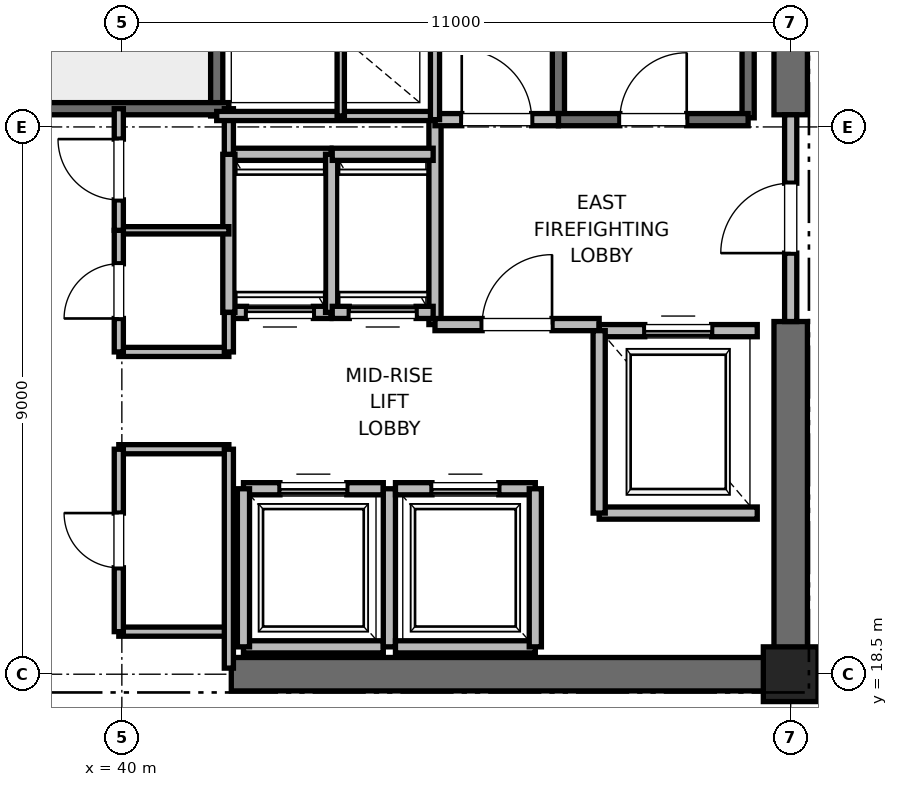
"""IFC4 building model, lengths in metres.
Left out: names, types, materials, properties, quantities, classifications, styles, units other than length and angle.
Written with IfcOpenShell. Run it as: python <this file> out.ifc"""

import sys

from ifc_helpers import new_model, si_unit, direction, frame, frame_2d, origin, origin_2d, place, context, subcontext, project, spatial, rectangle, extrude, element, fill, save


model = new_model("IFC4")
c1 = context("Model", 3, precision=1e-05, world=origin(), true_north=direction((0.0, 1.0)))
c2 = subcontext(c1, "Body", "Model", "MODEL_VIEW")
j1 = project(units=[si_unit("LENGTHUNIT", "METRE"), si_unit("PLANEANGLEUNIT", "RADIAN")], contexts=[c1])
p1 = place(None, origin())
s1 = spatial("IfcSite", under=j1, at=p1, CompositionType="ELEMENT")
p2 = place(p1, origin())
s2 = spatial("IfcBuilding", under=s1, at=p2, CompositionType="ELEMENT")
p3 = place(p2, frame((0.0, 0.0, 221.2)))
s3 = spatial("IfcBuildingStorey", under=s2, at=p3, CompositionType="ELEMENT", Elevation=221.2)
p4 = place(p3, frame((51.0, 18.5, 0.0), z_axis=(0.0, 0.0, 1.0), x_axis=(1.0, 0.0, 0.0)))
e1 = element("IfcColumn", 1, at=p4, inside=s3, PredefinedType="PILASTER", context=c2, shape_type="SweptSolid", body=[
    extrude(rectangle(XDim=0.9, YDim=0.9, at=origin_2d()), origin(), (0.0, 0.0, 1.0), 4.0),
])
p5 = place(p3, frame((41.8, 18.5, 0.0), z_axis=(0.0, 0.0, 1.0), x_axis=(1.0, 0.0, 0.0)))
e2 = element("IfcWall", 2, at=p5, inside=s3, PredefinedType="SHEAR", context=c2, shape_type="SweptSolid", body=[
    extrude(rectangle(XDim=9.2, YDim=0.55, at=frame_2d((4.6, 0.0))), origin(), (0.0, 0.0, 1.0), 3.775),
])
p6 = place(p3, frame((51.0, 18.5, 0.0), z_axis=(0.0, 0.0, 1.0), x_axis=(0.0, 1.0, 0.0)))
e3 = element("IfcWall", 3, at=p6, inside=s3, PredefinedType="SHEAR", context=c2, shape_type="SweptSolid", body=[
    extrude(rectangle(XDim=5.8, YDim=0.55, at=frame_2d((2.9, 0.0))), origin(), (0.0, 0.0, 1.0), 3.775),
])
p7 = place(p3, frame((51.0, 27.7, 0.0), z_axis=(0.0, 0.0, 1.0), x_axis=(0.0, 1.0, 0.0)))
e4 = element("IfcWall", 4, at=p7, inside=s3, PredefinedType="SHEAR", context=c2, shape_type="SweptSolid", body=[
    extrude(rectangle(XDim=8.8, YDim=0.55, at=frame_2d((4.4, 0.0))), origin(), (0.0, 0.0, 1.0), 3.775),
])
p8 = place(p3, frame((50.3, 27.65, 0.0), z_axis=(0.0, 0.0, 1.0), x_axis=(0.0, 1.0, 0.0)))
e5 = element("IfcWall", 5, at=p8, inside=s3, PredefinedType="SOLIDWALL", context=c2, shape_type="SweptSolid", body=[
    extrude(rectangle(XDim=8.15, YDim=0.2, at=frame_2d((4.075, 0.0))), origin(), (0.0, 0.0, 1.0), 3.775),
])
p9 = place(p3, frame((47.18, 27.62, 0.0), z_axis=(0.0, 0.0, 1.0), x_axis=(0.0, 1.0, 0.0)))
e6 = element("IfcWall", 6, at=p9, inside=s3, PredefinedType="SOLIDWALL", context=c2, shape_type="SweptSolid", body=[
    extrude(rectangle(XDim=8.18, YDim=0.2, at=frame_2d((4.09, 0.0))), origin(), (0.0, 0.0, 1.0), 3.775),
])
p10 = place(p3, frame((47.18, 27.62, 0.0), z_axis=(0.0, 0.0, 1.0), x_axis=(1.0, 0.0, 0.0)))
e7 = element("IfcWall", 7, at=p10, inside=s3, PredefinedType="SOLIDWALL", context=c2, shape_type="SweptSolid", body=[
    extrude(rectangle(XDim=3.12, YDim=0.2, at=frame_2d((1.56, 0.0))), origin(), (0.0, 0.0, 1.0), 3.775),
])
p11 = place(p10, frame((1.01, 0.0, 0.0)))
e8 = element("IfcOpeningElement", 8, at=p11, cuts=e7, PredefinedType="OPENING", context=c2, shape_type="SweptSolid", body=[
    extrude(rectangle(XDim=1.1, YDim=2.15, at=frame_2d((0.55, 1.075))), frame((0.0, 0.1, 0.0), z_axis=(0.0, -1.0, 0.0), x_axis=(1.0, 0.0, 0.0)), (0.0, 0.0, 1.0), 0.2),
])
p12 = place(p3, frame((41.56, 27.68, 0.0), z_axis=(0.0, 0.0, 1.0), x_axis=(0.0, 1.0, 0.0)))
e9 = element("IfcWall", 9, at=p12, inside=s3, PredefinedType="SOLIDWALL", context=c2, shape_type="SweptSolid", body=[
    extrude(rectangle(XDim=8.57, YDim=0.2, at=frame_2d((4.285, 0.0))), origin(), (0.0, 0.0, 1.0), 3.775),
])
p13 = place(p3, frame((38.44, 27.8, 0.0), z_axis=(0.0, 0.0, 1.0), x_axis=(1.0, 0.0, 0.0)))
e10 = element("IfcWall", 10, at=p13, inside=s3, PredefinedType="SOLIDWALL", context=c2, shape_type="SweptSolid", body=[
    extrude(rectangle(XDim=3.32, YDim=0.2, at=frame_2d((1.66, 0.0))), origin(), (0.0, 0.0, 1.0), 3.775),
])
p14 = place(p3, frame((45.15, 24.25, 0.0), z_axis=(0.0, 0.0, 1.0), x_axis=(0.0, 1.0, 0.0)))
e11 = element("IfcWall", 11, at=p14, inside=s3, PredefinedType="PARTITIONING", context=c2, shape_type="SweptSolid", body=[
    extrude(rectangle(XDim=3.37, YDim=0.2, at=frame_2d((1.685, 0.0))), origin(), (0.0, 0.0, 1.0), 3.775),
])
p15 = place(p3, frame((45.15, 24.25, 0.0), z_axis=(0.0, 0.0, 1.0), x_axis=(1.0, 0.0, 0.0)))
e12 = element("IfcWall", 12, at=p15, inside=s3, PredefinedType="PARTITIONING", context=c2, shape_type="SweptSolid", body=[
    extrude(rectangle(XDim=2.7, YDim=0.2, at=frame_2d((1.35, 0.0))), origin(), (0.0, 0.0, 1.0), 3.775),
])
p16 = place(p15, frame((0.775, 0.0, 0.0)))
e13 = element("IfcOpeningElement", 13, at=p16, cuts=e12, PredefinedType="OPENING", context=c2, shape_type="SweptSolid", body=[
    extrude(rectangle(XDim=1.15, YDim=2.2, at=frame_2d((0.575, 1.1))), frame((0.0, 0.1, 0.0), z_axis=(0.0, -1.0, 0.0), x_axis=(1.0, 0.0, 0.0)), (0.0, 0.0, 1.0), 0.2),
])
p17 = place(p3, frame((45.15, 27.62, 0.0), z_axis=(0.0, 0.0, 1.0), x_axis=(1.0, 0.0, 0.0)))
e14 = element("IfcWall", 14, at=p17, inside=s3, PredefinedType="PARTITIONING", context=c2, shape_type="SweptSolid", body=[
    extrude(rectangle(XDim=2.03, YDim=0.2, at=frame_2d((1.015, 0.0))), origin(), (0.0, 0.0, 1.0), 3.775),
])
p18 = place(p17, frame((0.44, 0.0, 0.0)))
e15 = element("IfcOpeningElement", 15, at=p18, cuts=e14, PredefinedType="OPENING", context=c2, shape_type="SweptSolid", body=[
    extrude(rectangle(XDim=1.15, YDim=2.2, at=frame_2d((0.575, 1.1))), frame((0.0, 0.1, 0.0), z_axis=(0.0, -1.0, 0.0), x_axis=(1.0, 0.0, 0.0)), (0.0, 0.0, 1.0), 0.2),
])
p19 = place(p3, frame((51.0, 24.3, 0.0), z_axis=(0.0, 0.0, 1.0), x_axis=(0.0, 1.0, 0.0)))
e16 = element("IfcWall", 16, at=p19, inside=s3, PredefinedType="PARTITIONING", context=c2, shape_type="SweptSolid", body=[
    extrude(rectangle(XDim=3.4, YDim=0.2, at=frame_2d((1.7, 0.0))), origin(), (0.0, 0.0, 1.0), 2.755),
])
p20 = place(p19, frame((1.125, 0.0, 0.0)))
e17 = element("IfcOpeningElement", 17, at=p20, cuts=e16, PredefinedType="OPENING", context=c2, shape_type="SweptSolid", body=[
    extrude(rectangle(XDim=1.15, YDim=2.2, at=frame_2d((0.575, 1.1))), frame((0.0, 0.1, 0.0), z_axis=(0.0, -1.0, 0.0), x_axis=(1.0, 0.0, 0.0)), (0.0, 0.0, 1.0), 0.2),
])
p21 = place(p3, frame((47.85, 21.15, 0.0), z_axis=(0.0, 0.0, 1.0), x_axis=(1.0, 0.0, 0.0)))
e18 = element("IfcWall", 18, at=p21, inside=s3, PredefinedType="SOLIDWALL", context=c2, shape_type="SweptSolid", body=[
    extrude(rectangle(XDim=2.6, YDim=0.2, at=frame_2d((1.3, 0.0))), origin(), (0.0, 0.0, 1.0), 3.775),
])
p22 = place(p3, frame((50.45, 24.15, 0.0), z_axis=(0.0, 0.0, 1.0), x_axis=(-1.0, 0.0, 0.0)))
e19 = element("IfcWall", 19, at=p22, inside=s3, PredefinedType="SOLIDWALL", context=c2, shape_type="SweptSolid", body=[
    extrude(rectangle(XDim=2.6, YDim=0.2, at=frame_2d((1.3, 0.0))), origin(), (0.0, 0.0, 1.0), 2.755),
])
p23 = place(p22, frame((0.75, 0.0, 0.0)))
e20 = element("IfcOpeningElement", 20, at=p23, cuts=e19, PredefinedType="OPENING", context=c2, shape_type="SweptSolid", body=[
    extrude(rectangle(XDim=1.1, YDim=2.2, at=frame_2d((0.55, 1.1))), frame((0.0, 0.1, 0.0), z_axis=(0.0, -1.0, 0.0), x_axis=(1.0, 0.0, 0.0)), (0.0, 0.0, 1.0), 0.2),
])
p24 = place(p3, frame((47.85, 24.15, 0.0), z_axis=(0.0, 0.0, 1.0), x_axis=(0.0, -1.0, 0.0)))
e21 = element("IfcWall", 21, at=p24, inside=s3, PredefinedType="SOLIDWALL", context=c2, shape_type="SweptSolid", body=[
    extrude(rectangle(XDim=3.0, YDim=0.2, at=frame_2d((1.5, 0.0))), origin(), (0.0, 0.0, 1.0), 3.775),
])
p25 = place(p3, frame((42.0, 18.95, 0.0), z_axis=(0.0, 0.0, 1.0), x_axis=(1.0, 0.0, 0.0)))
e22 = element("IfcWall", 22, at=p25, inside=s3, PredefinedType="SOLIDWALL", context=c2, shape_type="SweptSolid", body=[
    extrude(rectangle(XDim=2.3, YDim=0.2, at=frame_2d((1.15, 0.0))), origin(), (0.0, 0.0, 1.0), 2.755),
])
p26 = place(p3, frame((44.3, 21.55, 0.0), z_axis=(0.0, 0.0, 1.0), x_axis=(-1.0, 0.0, 0.0)))
e23 = element("IfcWall", 23, at=p26, inside=s3, PredefinedType="SOLIDWALL", context=c2, shape_type="SweptSolid", body=[
    extrude(rectangle(XDim=2.3, YDim=0.2, at=frame_2d((1.15, 0.0))), origin(), (0.0, 0.0, 1.0), 3.775),
])
p27 = place(p26, frame((0.6, 0.0, 0.0)))
e24 = element("IfcOpeningElement", 24, at=p27, cuts=e23, PredefinedType="OPENING", context=c2, shape_type="SweptSolid", body=[
    extrude(rectangle(XDim=1.1, YDim=2.2, at=frame_2d((0.55, 1.1))), frame((0.0, 0.1, 0.0), z_axis=(0.0, -1.0, 0.0), x_axis=(1.0, 0.0, 0.0)), (0.0, 0.0, 1.0), 0.2),
])
p28 = place(p3, frame((42.0, 21.55, 0.0), z_axis=(0.0, 0.0, 1.0), x_axis=(0.0, -1.0, 0.0)))
e25 = element("IfcWall", 25, at=p28, inside=s3, PredefinedType="SOLIDWALL", context=c2, shape_type="SweptSolid", body=[
    extrude(rectangle(XDim=2.6, YDim=0.2, at=frame_2d((1.3, 0.0))), origin(), (0.0, 0.0, 1.0), 2.755),
])
p29 = place(p3, frame((44.4, 18.95, 0.0), z_axis=(0.0, 0.0, 1.0), x_axis=(0.0, 1.0, 0.0)))
e26 = element("IfcWall", 26, at=p29, inside=s3, PredefinedType="SOLIDWALL", context=c2, shape_type="SweptSolid", body=[
    extrude(rectangle(XDim=2.6, YDim=0.2, at=frame_2d((1.3, 0.0))), origin(), (0.0, 0.0, 1.0), 3.775),
])
p30 = place(p3, frame((44.5, 18.95, 0.0), z_axis=(0.0, 0.0, 1.0), x_axis=(1.0, 0.0, 0.0)))
e27 = element("IfcWall", 27, at=p30, inside=s3, PredefinedType="SOLIDWALL", context=c2, shape_type="SweptSolid", body=[
    extrude(rectangle(XDim=2.3, YDim=0.2, at=frame_2d((1.15, 0.0))), origin(), (0.0, 0.0, 1.0), 3.775),
])
p31 = place(p3, frame((46.8, 21.55, 0.0), z_axis=(0.0, 0.0, 1.0), x_axis=(-1.0, 0.0, 0.0)))
e28 = element("IfcWall", 28, at=p31, inside=s3, PredefinedType="SOLIDWALL", context=c2, shape_type="SweptSolid", body=[
    extrude(rectangle(XDim=2.3, YDim=0.2, at=frame_2d((1.15, 0.0))), origin(), (0.0, 0.0, 1.0), 3.775),
])
p32 = place(p31, frame((0.6, 0.0, 0.0)))
e29 = element("IfcOpeningElement", 29, at=p32, cuts=e28, PredefinedType="OPENING", context=c2, shape_type="SweptSolid", body=[
    extrude(rectangle(XDim=1.1, YDim=2.2, at=frame_2d((0.55, 1.1))), frame((0.0, 0.1, 0.0), z_axis=(0.0, -1.0, 0.0), x_axis=(1.0, 0.0, 0.0)), (0.0, 0.0, 1.0), 0.2),
])
p33 = place(p3, frame((46.8, 18.95, 0.0), z_axis=(0.0, 0.0, 1.0), x_axis=(0.0, 1.0, 0.0)))
e30 = element("IfcWall", 30, at=p33, inside=s3, PredefinedType="SOLIDWALL", context=c2, shape_type="SweptSolid", body=[
    extrude(rectangle(XDim=2.6, YDim=0.2, at=frame_2d((1.3, 0.0))), origin(), (0.0, 0.0, 1.0), 3.775),
])
p34 = place(p3, frame((41.76, 24.45, 0.0), z_axis=(0.0, 0.0, 1.0), x_axis=(1.0, 0.0, 0.0)))
e31 = element("IfcWall", 31, at=p34, inside=s3, PredefinedType="SOLIDWALL", context=c2, shape_type="SweptSolid", body=[
    extrude(rectangle(XDim=1.68, YDim=0.2, at=frame_2d((0.84, 0.0))), origin(), (0.0, 0.0, 1.0), 3.775),
])
p35 = place(p34, frame((0.29, 0.0, 0.0)))
e32 = element("IfcOpeningElement", 32, at=p35, cuts=e31, PredefinedType="OPENING", context=c2, shape_type="SweptSolid", body=[
    extrude(rectangle(XDim=1.1, YDim=2.2, at=frame_2d((0.55, 1.1))), frame((0.0, 0.1, 0.0), z_axis=(0.0, -1.0, 0.0), x_axis=(1.0, 0.0, 0.0)), (0.0, 0.0, 1.0), 0.2),
])
p36 = place(p3, frame((43.44, 27.05, 0.0), z_axis=(0.0, 0.0, 1.0), x_axis=(-1.0, 0.0, 0.0)))
e33 = element("IfcWall", 33, at=p36, inside=s3, PredefinedType="SOLIDWALL", context=c2, shape_type="SweptSolid", body=[
    extrude(rectangle(XDim=1.68, YDim=0.2, at=frame_2d((0.84, 0.0))), origin(), (0.0, 0.0, 1.0), 3.775),
])
for number, where, z_axis, x_axis in (
    (34, (41.76, 27.05, 0.0), (0.0, 0.0, 1.0), (0.0, -1.0, 0.0)),
    (35, (43.45, 24.45, 0.0), (0.0, 0.0, 1.0), (0.0, 1.0, 0.0)),
):
    element("IfcWall", number, at=place(p3, frame(where, z_axis=z_axis, x_axis=x_axis)), inside=s3, PredefinedType="SOLIDWALL", context=c2, shape_type="SweptSolid", body=[
        extrude(rectangle(XDim=2.6, YDim=0.2, at=frame_2d((1.3, 0.0))), origin(), (0.0, 0.0, 1.0), 3.775),
    ])
p37 = place(p3, frame((43.46, 24.45, 0.0), z_axis=(0.0, 0.0, 1.0), x_axis=(1.0, 0.0, 0.0)))
e36 = element("IfcWall", 36, at=p37, inside=s3, PredefinedType="SOLIDWALL", context=c2, shape_type="SweptSolid", body=[
    extrude(rectangle(XDim=1.66, YDim=0.2, at=frame_2d((0.83, 0.0))), origin(), (0.0, 0.0, 1.0), 3.775),
])
p38 = place(p37, frame((0.28, 0.0, 0.0)))
e37 = element("IfcOpeningElement", 37, at=p38, cuts=e36, PredefinedType="OPENING", context=c2, shape_type="SweptSolid", body=[
    extrude(rectangle(XDim=1.1, YDim=2.2, at=frame_2d((0.55, 1.1))), frame((0.0, 0.1, 0.0), z_axis=(0.0, -1.0, 0.0), x_axis=(1.0, 0.0, 0.0)), (0.0, 0.0, 1.0), 0.2),
])
p39 = place(p3, frame((45.12, 27.05, 0.0), z_axis=(0.0, 0.0, 1.0), x_axis=(-1.0, 0.0, 0.0)))
e38 = element("IfcWall", 38, at=p39, inside=s3, PredefinedType="SOLIDWALL", context=c2, shape_type="SweptSolid", body=[
    extrude(rectangle(XDim=1.66, YDim=0.2, at=frame_2d((0.83, 0.0))), origin(), (0.0, 0.0, 1.0), 3.775),
])
for number, where, z_axis, x_axis in (
    (39, (39.95, 19.2, 0.0), (0.0, 0.0, 1.0), (1.0, 0.0, 0.0)),
    (40, (39.95, 22.2, 0.0), (0.0, 0.0, 1.0), (1.0, 0.0, 0.0)),
    (41, (39.95, 23.8, 0.0), (0.0, 0.0, 1.0), (1.0, 0.0, 0.0)),
):
    element("IfcWall", number, at=place(p3, frame(where, z_axis=z_axis, x_axis=x_axis)), inside=s3, PredefinedType="PARTITIONING", context=c2, shape_type="SweptSolid", body=[
        extrude(rectangle(XDim=1.81, YDim=0.15, at=frame_2d((0.905, 0.0))), origin(), (0.0, 0.0, 1.0), 2.85),
    ])
p40 = place(p3, frame((39.95, 25.8, 0.0), z_axis=(0.0, 0.0, 1.0), x_axis=(1.0, 0.0, 0.0)))
e42 = element("IfcWall", 42, at=p40, inside=s3, PredefinedType="PARTITIONING", context=c2, shape_type="SweptSolid", body=[
    extrude(rectangle(XDim=1.81, YDim=0.12, at=frame_2d((0.905, 0.0))), origin(), (0.0, 0.0, 1.0), 2.85),
])
p41 = place(p3, frame((41.76, 18.6, 0.0), z_axis=(0.0, 0.0, 1.0), x_axis=(0.0, 1.0, 0.0)))
e43 = element("IfcWall", 43, at=p41, inside=s3, PredefinedType="PARTITIONING", context=c2, shape_type="SweptSolid", body=[
    extrude(rectangle(XDim=3.6, YDim=0.15, at=frame_2d((1.8, 0.0))), origin(), (0.0, 0.0, 1.0), 2.755),
])
p42 = place(p3, frame((41.76, 23.8, 0.0), z_axis=(0.0, 0.0, 1.0), x_axis=(0.0, 1.0, 0.0)))
e44 = element("IfcWall", 44, at=p42, inside=s3, PredefinedType="PARTITIONING", context=c2, shape_type="SweptSolid", body=[
    extrude(rectangle(XDim=0.65, YDim=0.15, at=frame_2d((0.325, 0.0))), origin(), (0.0, 0.0, 1.0), 2.85),
])
p43 = place(p3, frame((41.76, 27.05, 0.0), z_axis=(0.0, 0.0, 1.0), x_axis=(0.0, 1.0, 0.0)))
e45 = element("IfcWall", 45, at=p43, inside=s3, PredefinedType="PARTITIONING", context=c2, shape_type="SweptSolid", body=[
    extrude(rectangle(XDim=0.75, YDim=0.15, at=frame_2d((0.375, 0.0))), origin(), (0.0, 0.0, 1.0), 2.85),
])
p44 = place(p3, frame((39.95, 19.2, 0.0), z_axis=(0.0, 0.0, 1.0), x_axis=(0.0, 1.0, 0.0)))
e46 = element("IfcWall", 46, at=p44, inside=s3, PredefinedType="PARTITIONING", context=c2, shape_type="SweptSolid", body=[
    extrude(rectangle(XDim=3.0, YDim=0.15, at=frame_2d((1.5, 0.0))), origin(), (0.0, 0.0, 1.0), 2.85),
])
p45 = place(p44, frame((1.05, 0.0, 0.0)))
e47 = element("IfcOpeningElement", 47, at=p45, cuts=e46, PredefinedType="OPENING", context=c2, shape_type="SweptSolid", body=[
    extrude(rectangle(XDim=0.9, YDim=2.1, at=frame_2d((0.45, 1.05))), frame((0.0, 0.075, 0.0), z_axis=(0.0, -1.0, 0.0), x_axis=(1.0, 0.0, 0.0)), (0.0, 0.0, 1.0), 0.15),
])
p46 = place(p3, frame((39.95, 23.8, 0.0), z_axis=(0.0, 0.0, 1.0), x_axis=(0.0, 1.0, 0.0)))
e48 = element("IfcWall", 48, at=p46, inside=s3, PredefinedType="PARTITIONING", context=c2, shape_type="SweptSolid", body=[
    extrude(rectangle(XDim=2.0, YDim=0.15, at=frame_2d((1.0, 0.0))), origin(), (0.0, 0.0, 1.0), 2.85),
])
p47 = place(p46, frame((0.55, 0.0, 0.0)))
e49 = element("IfcOpeningElement", 49, at=p47, cuts=e48, PredefinedType="OPENING", context=c2, shape_type="SweptSolid", body=[
    extrude(rectangle(XDim=0.9, YDim=2.1, at=frame_2d((0.45, 1.05))), frame((0.0, 0.075, 0.0), z_axis=(0.0, -1.0, 0.0), x_axis=(1.0, 0.0, 0.0)), (0.0, 0.0, 1.0), 0.15),
])
p48 = place(p3, frame((39.95, 25.8, 0.0), z_axis=(0.0, 0.0, 1.0), x_axis=(0.0, 1.0, 0.0)))
e50 = element("IfcWall", 50, at=p48, inside=s3, PredefinedType="PARTITIONING", context=c2, shape_type="SweptSolid", body=[
    extrude(rectangle(XDim=2.0, YDim=0.15, at=frame_2d((1.0, 0.0))), origin(), (0.0, 0.0, 1.0), 2.85),
])
p49 = place(p48, frame((0.5, 0.0, 0.0)))
e51 = element("IfcOpeningElement", 51, at=p49, cuts=e50, PredefinedType="OPENING", context=c2, shape_type="SweptSolid", body=[
    extrude(rectangle(XDim=1.0, YDim=2.15, at=frame_2d((0.5, 1.075))), frame((0.0, 0.075, 0.0), z_axis=(0.0, -1.0, 0.0), x_axis=(1.0, 0.0, 0.0)), (0.0, 0.0, 1.0), 0.15),
])
p50 = place(p3, frame((41.56, 27.68, 0.0), z_axis=(0.0, 0.0, 1.0), x_axis=(1.0, 0.0, 0.0)))
e52 = element("IfcWall", 52, at=p50, inside=s3, PredefinedType="PARTITIONING", context=c2, shape_type="SweptSolid", body=[
    extrude(rectangle(XDim=3.59, YDim=0.15, at=frame_2d((1.795, 0.0))), origin(), (0.0, 0.0, 1.0), 2.85),
])
p51 = place(p3, frame((45.15, 27.62, 0.0), z_axis=(0.0, 0.0, 1.0), x_axis=(0.0, 1.0, 0.0)))
e53 = element("IfcWall", 53, at=p51, inside=s3, PredefinedType="PARTITIONING", context=c2, shape_type="SweptSolid", body=[
    extrude(rectangle(XDim=3.1, YDim=0.15, at=frame_2d((1.55, 0.0))), origin(), (0.0, 0.0, 1.0), 2.85),
])
p52 = place(p3, frame((43.6, 27.68, 0.0), z_axis=(0.0, 0.0, 1.0), x_axis=(0.0, 1.0, 0.0)))
e54 = element("IfcWall", 54, at=p52, inside=s3, PredefinedType="PARTITIONING", context=c2, shape_type="SweptSolid", body=[
    extrude(rectangle(XDim=3.04, YDim=0.12, at=frame_2d((1.52, 0.0))), origin(), (0.0, 0.0, 1.0), 2.85),
])
p53 = place(p11, origin())
e55 = element("IfcDoor", 55, at=p53, inside=s3, OperationType="SINGLE_SWING_RIGHT", PredefinedType="DOOR", context=c2, shape_type="SweptSolid", body=[
    extrude(rectangle(XDim=1.1, YDim=2.15, at=frame_2d((0.55, 1.075))), frame((0.0, 0.025, 0.0), z_axis=(0.0, -1.0, 0.0), x_axis=(1.0, 0.0, 0.0)), (0.0, 0.0, 1.0), 0.05),
])
fill(e8, e55)
p54 = place(p16, origin())
e56 = element("IfcDoor", 56, at=p54, inside=s3, OperationType="SINGLE_SWING_RIGHT", PredefinedType="DOOR", context=c2, shape_type="SweptSolid", body=[
    extrude(rectangle(XDim=1.15, YDim=2.2, at=frame_2d((0.575, 1.1))), frame((0.0, 0.025, 0.0), z_axis=(0.0, -1.0, 0.0), x_axis=(1.0, 0.0, 0.0)), (0.0, 0.0, 1.0), 0.05),
])
fill(e13, e56)
p55 = place(p18, origin())
e57 = element("IfcDoor", 57, at=p55, inside=s3, OperationType="SINGLE_SWING_LEFT", PredefinedType="DOOR", context=c2, shape_type="SweptSolid", body=[
    extrude(rectangle(XDim=1.15, YDim=2.2, at=frame_2d((0.575, 1.1))), frame((0.0, 0.025, 0.0), z_axis=(0.0, -1.0, 0.0), x_axis=(1.0, 0.0, 0.0)), (0.0, 0.0, 1.0), 0.05),
])
fill(e15, e57)
p56 = place(p20, origin())
e58 = element("IfcDoor", 58, at=p56, inside=s3, OperationType="SINGLE_SWING_LEFT", PredefinedType="DOOR", context=c2, shape_type="SweptSolid", body=[
    extrude(rectangle(XDim=1.15, YDim=2.2, at=frame_2d((0.575, 1.1))), frame((0.0, 0.025, 0.0), z_axis=(0.0, -1.0, 0.0), x_axis=(1.0, 0.0, 0.0)), (0.0, 0.0, 1.0), 0.05),
])
fill(e17, e58)
p57 = place(p23, origin())
e59 = element("IfcDoor", 59, at=p57, inside=s3, OperationType="SLIDING_TO_RIGHT", PredefinedType="DOOR", context=c2, shape_type="SweptSolid", body=[
    extrude(rectangle(XDim=1.1, YDim=2.2, at=frame_2d((0.55, 1.1))), frame((0.0, 0.025, 0.0), z_axis=(0.0, -1.0, 0.0), x_axis=(1.0, 0.0, 0.0)), (0.0, 0.0, 1.0), 0.05),
])
fill(e20, e59)
p58 = place(p27, origin())
e60 = element("IfcDoor", 60, at=p58, inside=s3, OperationType="SLIDING_TO_RIGHT", PredefinedType="DOOR", context=c2, shape_type="SweptSolid", body=[
    extrude(rectangle(XDim=1.1, YDim=2.2, at=frame_2d((0.55, 1.1))), frame((0.0, 0.025, 0.0), z_axis=(0.0, -1.0, 0.0), x_axis=(1.0, 0.0, 0.0)), (0.0, 0.0, 1.0), 0.05),
])
fill(e24, e60)
p59 = place(p32, origin())
e61 = element("IfcDoor", 61, at=p59, inside=s3, OperationType="SLIDING_TO_RIGHT", PredefinedType="DOOR", context=c2, shape_type="SweptSolid", body=[
    extrude(rectangle(XDim=1.1, YDim=2.2, at=frame_2d((0.55, 1.1))), frame((0.0, 0.025, 0.0), z_axis=(0.0, -1.0, 0.0), x_axis=(1.0, 0.0, 0.0)), (0.0, 0.0, 1.0), 0.05),
])
fill(e29, e61)
p60 = place(p35, origin())
e62 = element("IfcDoor", 62, at=p60, inside=s3, OperationType="SLIDING_TO_RIGHT", PredefinedType="DOOR", context=c2, shape_type="SweptSolid", body=[
    extrude(rectangle(XDim=1.1, YDim=2.2, at=frame_2d((0.55, 1.1))), frame((0.0, 0.025, 0.0), z_axis=(0.0, -1.0, 0.0), x_axis=(1.0, 0.0, 0.0)), (0.0, 0.0, 1.0), 0.05),
])
fill(e32, e62)
p61 = place(p38, origin())
e63 = element("IfcDoor", 63, at=p61, inside=s3, OperationType="SLIDING_TO_RIGHT", PredefinedType="DOOR", context=c2, shape_type="SweptSolid", body=[
    extrude(rectangle(XDim=1.1, YDim=2.2, at=frame_2d((0.55, 1.1))), frame((0.0, 0.025, 0.0), z_axis=(0.0, -1.0, 0.0), x_axis=(1.0, 0.0, 0.0)), (0.0, 0.0, 1.0), 0.05),
])
fill(e37, e63)
p62 = place(p45, origin())
e64 = element("IfcDoor", 64, at=p62, inside=s3, OperationType="SINGLE_SWING_RIGHT", PredefinedType="DOOR", context=c2, shape_type="SweptSolid", body=[
    extrude(rectangle(XDim=0.9, YDim=2.1, at=frame_2d((0.45, 1.05))), frame((0.0, 0.025, 0.0), z_axis=(0.0, -1.0, 0.0), x_axis=(1.0, 0.0, 0.0)), (0.0, 0.0, 1.0), 0.05),
])
fill(e47, e64)
p63 = place(p47, origin())
e65 = element("IfcDoor", 65, at=p63, inside=s3, OperationType="SINGLE_SWING_LEFT", PredefinedType="DOOR", context=c2, shape_type="SweptSolid", body=[
    extrude(rectangle(XDim=0.9, YDim=2.1, at=frame_2d((0.45, 1.05))), frame((0.0, 0.025, 0.0), z_axis=(0.0, -1.0, 0.0), x_axis=(1.0, 0.0, 0.0)), (0.0, 0.0, 1.0), 0.05),
])
fill(e49, e65)
p64 = place(p49, origin())
e66 = element("IfcDoor", 66, at=p64, inside=s3, OperationType="SINGLE_SWING_RIGHT", PredefinedType="DOOR", context=c2, shape_type="SweptSolid", body=[
    extrude(rectangle(XDim=1.0, YDim=2.15, at=frame_2d((0.5, 1.075))), frame((0.0, 0.025, 0.0), z_axis=(0.0, -1.0, 0.0), x_axis=(1.0, 0.0, 0.0)), (0.0, 0.0, 1.0), 0.05),
])
fill(e51, e66)
save(model, sys.argv[1])
